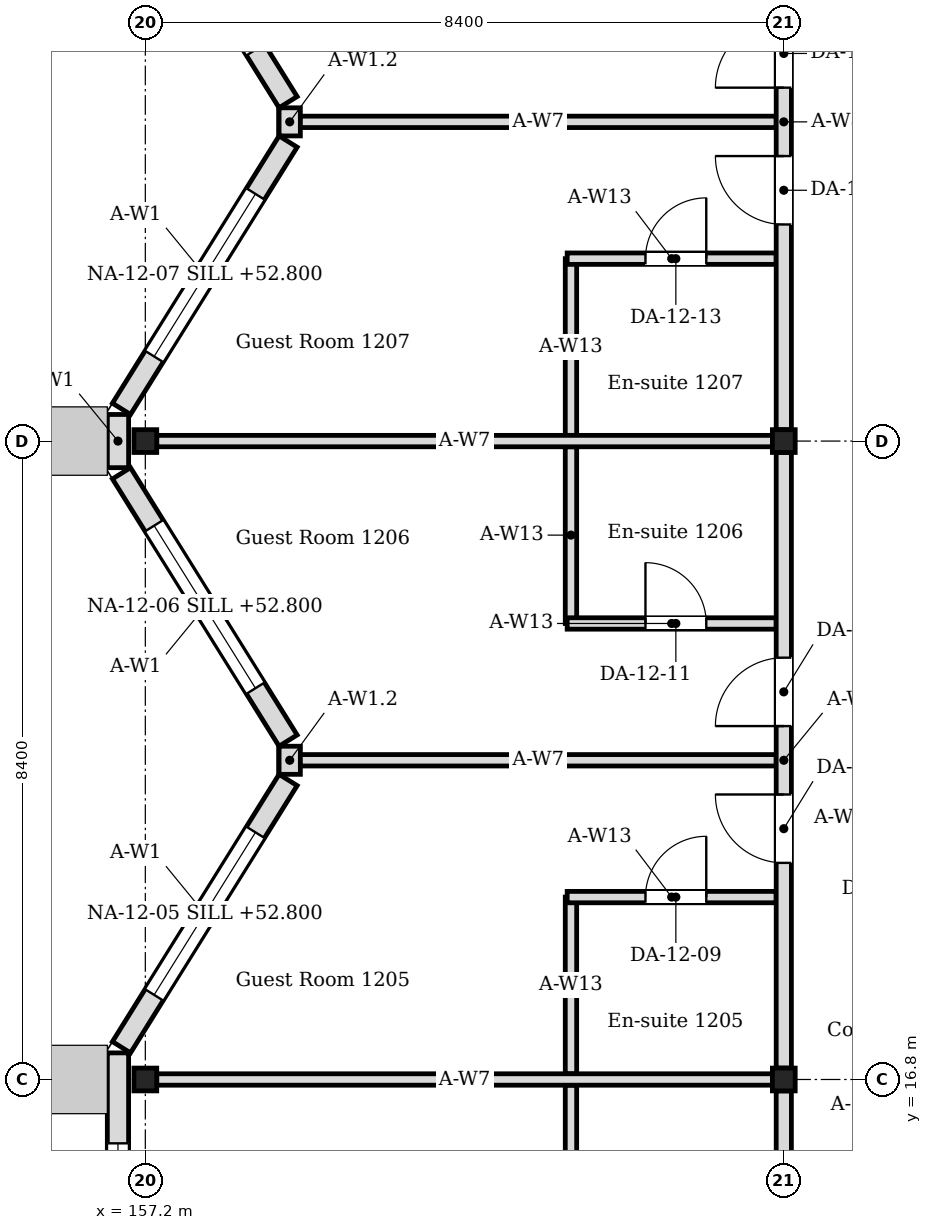
"""IFC4 building model, lengths in metres.
Left out: names, types, materials, properties, quantities, classifications, styles, units other than length and angle.
Written with IfcOpenShell. Run it as: python <this file> out.ifc"""

import sys

from ifc_helpers import new_model, si_unit, direction, frame, frame_2d, origin, origin_2d, place, context, subcontext, project, spatial, rectangle, i_section, extrude, element, fill, save


model = new_model("IFC4")
c1 = context("Model", 3, precision=1e-05, world=origin(), true_north=direction((0.0, 1.0)))
c2 = subcontext(c1, "Body", "Model", "MODEL_VIEW")
j1 = project(units=[si_unit("LENGTHUNIT", "METRE"), si_unit("PLANEANGLEUNIT", "RADIAN")], contexts=[c1])
p1 = place(None, origin())
s1 = spatial("IfcSite", under=j1, at=p1, CompositionType="ELEMENT")
p2 = place(p1, origin())
s2 = spatial("IfcBuilding", under=s1, at=p2, CompositionType="ELEMENT")
p3 = place(p2, frame((0.0, 0.0, 52.2)))
s3 = spatial("IfcBuildingStorey", under=s2, at=p3, CompositionType="ELEMENT", Elevation=52.2)
for number, where, z_axis, x_axis in (
    (1, (157.2, 16.8, 0.0), (0.0, 0.0, 1.0), (1.0, 0.0, 0.0)),
    (2, (157.2, 25.2, 0.0), (0.0, 0.0, 1.0), (1.0, 0.0, 0.0)),
    (3, (165.6, 16.8, 0.0), (0.0, 0.0, 1.0), (1.0, 0.0, 0.0)),
    (4, (165.6, 25.2, 0.0), (0.0, 0.0, 1.0), (1.0, 0.0, 0.0)),
):
    element("IfcColumn", number, at=place(p3, frame(where, z_axis=z_axis, x_axis=x_axis)), inside=s3, PredefinedType="COLUMN", context=c2, shape_type="SweptSolid", body=[
        extrude(i_section(OverallWidth=0.3, OverallDepth=0.3, WebThickness=0.01, FlangeThickness=0.015, FilletRadius=0.013, at=origin_2d()), origin(), (0.0, 0.0, 1.0), 4.2),
    ])
p4 = place(p3, frame((156.84, 8.05, 0.0), z_axis=(0.0, 0.0, 1.0), x_axis=(0.0, 1.0, 0.0)))
e5 = element("IfcWall", 5, at=p4, inside=s3, PredefinedType="SOLIDWALL", context=c2, shape_type="SweptSolid", body=[
    extrude(rectangle(XDim=9.1, YDim=0.28, at=frame_2d((4.55, 0.0))), origin(), (0.0, 0.0, 1.0), 4.05),
])
p5 = place(p4, frame((1.19, 0.0, 0.6)))
e6 = element("IfcOpeningElement", 6, at=p5, cuts=e5, PredefinedType="OPENING", context=c2, shape_type="SweptSolid", body=[
    extrude(rectangle(XDim=2.52, YDim=2.4, at=frame_2d((1.26, 1.2))), frame((0.0, 0.15, 0.0), z_axis=(0.0, -1.0, 0.0), x_axis=(1.0, 0.0, 0.0)), (0.0, 0.0, 1.0), 0.3),
])
p6 = place(p4, frame((5.39, 0.0, 0.6)))
e7 = element("IfcOpeningElement", 7, at=p6, cuts=e5, PredefinedType="OPENING", context=c2, shape_type="SweptSolid", body=[
    extrude(rectangle(XDim=2.52, YDim=2.4, at=frame_2d((1.26, 1.2))), frame((0.0, 0.15, 0.0), z_axis=(0.0, -1.0, 0.0), x_axis=(1.0, 0.0, 0.0)), (0.0, 0.0, 1.0), 0.3),
])
p7 = place(p3, frame((156.886, 17.224, 0.0), z_axis=(0.0, 0.0, 1.0), x_axis=(0.529018946142, 0.848610013271, 0.0)))
e8 = element("IfcWall", 8, at=p7, inside=s3, PredefinedType="SOLIDWALL", context=c2, shape_type="SweptSolid", body=[
    extrude(rectangle(XDim=4.144, YDim=0.28, at=frame_2d((2.072, 0.0))), origin(), (0.0, 0.0, 1.0), 4.05),
])
p8 = place(p7, frame((0.812, 0.0, 0.6)))
e9 = element("IfcOpeningElement", 9, at=p8, cuts=e8, PredefinedType="OPENING", context=c2, shape_type="SweptSolid", body=[
    extrude(rectangle(XDim=2.52, YDim=2.4, at=frame_2d((1.26, 1.2))), frame((0.0, 0.15, 0.0), z_axis=(0.0, -1.0, 0.0), x_axis=(1.0, 0.0, 0.0)), (0.0, 0.0, 1.0), 0.3),
])
p9 = place(p3, frame((159.079, 21.259, 0.0), z_axis=(0.0, 0.0, 1.0), x_axis=(-0.529018946142, 0.848610013271, 0.0)))
e10 = element("IfcWall", 10, at=p9, inside=s3, PredefinedType="SOLIDWALL", context=c2, shape_type="SweptSolid", body=[
    extrude(rectangle(XDim=4.144, YDim=0.28, at=frame_2d((2.072, 0.0))), origin(), (0.0, 0.0, 1.0), 4.05),
])
p10 = place(p9, frame((0.812, 0.0, 0.6)))
e11 = element("IfcOpeningElement", 11, at=p10, cuts=e10, PredefinedType="OPENING", context=c2, shape_type="SweptSolid", body=[
    extrude(rectangle(XDim=2.52, YDim=2.4, at=frame_2d((1.26, 1.2))), frame((0.0, 0.15, 0.0), z_axis=(0.0, -1.0, 0.0), x_axis=(1.0, 0.0, 0.0)), (0.0, 0.0, 1.0), 0.3),
])
p11 = place(p3, frame((159.1, 20.815, 0.0), z_axis=(0.0, 0.0, 1.0), x_axis=(0.0, 1.0, 0.0)))
e12 = element("IfcWall", 12, at=p11, inside=s3, PredefinedType="SOLIDWALL", context=c2, shape_type="SweptSolid", body=[
    extrude(rectangle(XDim=0.37, YDim=0.28, at=frame_2d((0.185, 0.0))), origin(), (0.0, 0.0, 1.0), 3.604),
])
p12 = place(p3, frame((156.84, 24.85, 0.0), z_axis=(0.0, 0.0, 1.0), x_axis=(0.0, 1.0, 0.0)))
e13 = element("IfcWall", 13, at=p12, inside=s3, PredefinedType="SOLIDWALL", context=c2, shape_type="SweptSolid", body=[
    extrude(rectangle(XDim=0.7, YDim=0.28, at=frame_2d((0.35, 0.0))), origin(), (0.0, 0.0, 1.0), 4.05),
])
p13 = place(p3, frame((156.886, 25.624, 0.0), z_axis=(0.0, 0.0, 1.0), x_axis=(0.528992500338, 0.848626498871, 0.0)))
e14 = element("IfcWall", 14, at=p13, inside=s3, PredefinedType="SOLIDWALL", context=c2, shape_type="SweptSolid", body=[
    extrude(rectangle(XDim=4.145, YDim=0.28, at=frame_2d((2.072, 0.0))), origin(), (0.0, 0.0, 1.0), 4.05),
])
p14 = place(p13, frame((0.812, 0.0, 0.6)))
e15 = element("IfcOpeningElement", 15, at=p14, cuts=e14, PredefinedType="OPENING", context=c2, shape_type="SweptSolid", body=[
    extrude(rectangle(XDim=2.52, YDim=2.4, at=frame_2d((1.26, 1.2))), frame((0.0, 0.15, 0.0), z_axis=(0.0, -1.0, 0.0), x_axis=(1.0, 0.0, 0.0)), (0.0, 0.0, 1.0), 0.3),
])
p15 = place(p3, frame((159.079, 29.659, 0.0), z_axis=(0.0, 0.0, 1.0), x_axis=(-0.529018946142, 0.848610013271, 0.0)))
e16 = element("IfcWall", 16, at=p15, inside=s3, PredefinedType="SOLIDWALL", context=c2, shape_type="SweptSolid", body=[
    extrude(rectangle(XDim=4.144, YDim=0.28, at=frame_2d((2.072, 0.0))), origin(), (0.0, 0.0, 1.0), 4.05),
])
p16 = place(p15, frame((0.812, 0.0, 0.6)))
e17 = element("IfcOpeningElement", 17, at=p16, cuts=e16, PredefinedType="OPENING", context=c2, shape_type="SweptSolid", body=[
    extrude(rectangle(XDim=2.52, YDim=2.4, at=frame_2d((1.26, 1.2))), frame((0.0, 0.15, 0.0), z_axis=(0.0, -1.0, 0.0), x_axis=(1.0, 0.0, 0.0)), (0.0, 0.0, 1.0), 0.3),
])
p17 = place(p3, frame((159.1, 29.215, 0.0), z_axis=(0.0, 0.0, 1.0), x_axis=(0.0, 1.0, 0.0)))
e18 = element("IfcWall", 18, at=p17, inside=s3, PredefinedType="SOLIDWALL", context=c2, shape_type="SweptSolid", body=[
    extrude(rectangle(XDim=0.37, YDim=0.28, at=frame_2d((0.185, 0.0))), origin(), (0.0, 0.0, 1.0), 3.604),
])
p18 = place(p3, frame((162.8, 14.4, 0.0), z_axis=(0.0, 0.0, 1.0), x_axis=(0.0, 1.0, 0.0)))
e19 = element("IfcWall", 19, at=p18, inside=s3, PredefinedType="PARTITIONING", context=c2, shape_type="SweptSolid", body=[
    extrude(rectangle(XDim=2.325, YDim=0.15, at=frame_2d((1.163, 0.0))), origin(), (0.0, 0.0, 1.0), 4.05),
])
p19 = place(p3, frame((162.8, 16.875, 0.0), z_axis=(0.0, 0.0, 1.0), x_axis=(0.0, 1.0, 0.0)))
e20 = element("IfcWall", 20, at=p19, inside=s3, PredefinedType="PARTITIONING", context=c2, shape_type="SweptSolid", body=[
    extrude(rectangle(XDim=2.325, YDim=0.15, at=frame_2d((1.163, 0.0))), origin(), (0.0, 0.0, 1.0), 4.05),
])
p20 = place(p3, frame((162.75, 19.2, 0.0), z_axis=(0.0, 0.0, 1.0), x_axis=(1.0, 0.0, 0.0)))
e21 = element("IfcWall", 21, at=p20, inside=s3, PredefinedType="PARTITIONING", context=c2, shape_type="SweptSolid", body=[
    extrude(rectangle(XDim=2.75, YDim=0.15, at=frame_2d((1.375, 0.0))), origin(), (0.0, 0.0, 1.0), 4.05),
])
p21 = place(p20, frame((1.03, 0.0, 0.0)))
e22 = element("IfcOpeningElement", 22, at=p21, cuts=e21, PredefinedType="OPENING", context=c2, shape_type="SweptSolid", body=[
    extrude(rectangle(XDim=0.8, YDim=2.1, at=frame_2d((0.4, 1.05))), frame((0.0, 0.085, 0.0), z_axis=(0.0, -1.0, 0.0), x_axis=(1.0, 0.0, 0.0)), (0.0, 0.0, 1.0), 0.17),
])
p22 = place(p3, frame((162.8, 22.8, 0.0), z_axis=(0.0, 0.0, 1.0), x_axis=(0.0, 1.0, 0.0)))
e23 = element("IfcWall", 23, at=p22, inside=s3, PredefinedType="PARTITIONING", context=c2, shape_type="SweptSolid", body=[
    extrude(rectangle(XDim=2.325, YDim=0.15, at=frame_2d((1.163, 0.0))), origin(), (0.0, 0.0, 1.0), 4.05),
])
p23 = place(p3, frame((162.75, 22.8, 0.0), z_axis=(0.0, 0.0, 1.0), x_axis=(1.0, 0.0, 0.0)))
e24 = element("IfcWall", 24, at=p23, inside=s3, PredefinedType="PARTITIONING", context=c2, shape_type="SweptSolid", body=[
    extrude(rectangle(XDim=2.75, YDim=0.15, at=frame_2d((1.375, 0.0))), origin(), (0.0, 0.0, 1.0), 4.05),
])
p24 = place(p23, frame((1.03, 0.0, 0.0)))
e25 = element("IfcOpeningElement", 25, at=p24, cuts=e24, PredefinedType="OPENING", context=c2, shape_type="SweptSolid", body=[
    extrude(rectangle(XDim=0.8, YDim=2.1, at=frame_2d((0.4, 1.05))), frame((0.0, 0.085, 0.0), z_axis=(0.0, -1.0, 0.0), x_axis=(1.0, 0.0, 0.0)), (0.0, 0.0, 1.0), 0.17),
])
p25 = place(p3, frame((162.8, 25.275, 0.0), z_axis=(0.0, 0.0, 1.0), x_axis=(0.0, 1.0, 0.0)))
e26 = element("IfcWall", 26, at=p25, inside=s3, PredefinedType="PARTITIONING", context=c2, shape_type="SweptSolid", body=[
    extrude(rectangle(XDim=2.325, YDim=0.15, at=frame_2d((1.163, 0.0))), origin(), (0.0, 0.0, 1.0), 4.05),
])
p26 = place(p3, frame((162.75, 27.6, 0.0), z_axis=(0.0, 0.0, 1.0), x_axis=(1.0, 0.0, 0.0)))
e27 = element("IfcWall", 27, at=p26, inside=s3, PredefinedType="PARTITIONING", context=c2, shape_type="SweptSolid", body=[
    extrude(rectangle(XDim=2.75, YDim=0.15, at=frame_2d((1.375, 0.0))), origin(), (0.0, 0.0, 1.0), 4.05),
])
p27 = place(p26, frame((1.03, 0.0, 0.0)))
e28 = element("IfcOpeningElement", 28, at=p27, cuts=e27, PredefinedType="OPENING", context=c2, shape_type="SweptSolid", body=[
    extrude(rectangle(XDim=0.8, YDim=2.1, at=frame_2d((0.4, 1.05))), frame((0.0, 0.085, 0.0), z_axis=(0.0, -1.0, 0.0), x_axis=(1.0, 0.0, 0.0)), (0.0, 0.0, 1.0), 0.17),
])
for number, where, z_axis, x_axis in (
    (29, (157.35, 16.8, 0.0), (0.0, 0.0, 1.0), (1.0, 0.0, 0.0)),
    (30, (157.35, 25.2, 0.0), (0.0, 0.0, 1.0), (1.0, 0.0, 0.0)),
):
    element("IfcWall", number, at=place(p3, frame(where, z_axis=z_axis, x_axis=x_axis)), inside=s3, PredefinedType="PARTITIONING", context=c2, shape_type="SweptSolid", body=[
        extrude(rectangle(XDim=8.1, YDim=0.15, at=frame_2d((4.05, 0.0))), origin(), (0.0, 0.0, 1.0), 3.604),
    ])
for number, where, z_axis, x_axis in (
    (31, (159.24, 21.0, 0.0), (0.0, 0.0, 1.0), (1.0, 0.0, 0.0)),
    (32, (159.24, 29.4, 0.0), (0.0, 0.0, 1.0), (1.0, 0.0, 0.0)),
):
    element("IfcWall", number, at=place(p3, frame(where, z_axis=z_axis, x_axis=x_axis)), inside=s3, PredefinedType="PARTITIONING", context=c2, shape_type="SweptSolid", body=[
        extrude(rectangle(XDim=6.26, YDim=0.15, at=frame_2d((3.13, 0.0))), origin(), (0.0, 0.0, 1.0), 3.604),
    ])
p28 = place(p3, frame((165.6, 8.55, 0.0), z_axis=(0.0, 0.0, 1.0), x_axis=(0.0, 1.0, 0.0)))
e33 = element("IfcWall", 33, at=p28, inside=s3, PredefinedType="PARTITIONING", context=c2, shape_type="SweptSolid", body=[
    extrude(rectangle(XDim=8.1, YDim=0.2, at=frame_2d((4.05, 0.0))), origin(), (0.0, 0.0, 1.0), 3.45),
])
p29 = place(p28, frame((2.7, 0.0, 0.0)))
e34 = element("IfcOpeningElement", 34, at=p29, cuts=e33, PredefinedType="OPENING", context=c2, shape_type="SweptSolid", body=[
    extrude(rectangle(XDim=0.9, YDim=2.1, at=frame_2d((0.45, 1.05))), frame((0.0, 0.11, 0.0), z_axis=(0.0, -1.0, 0.0), x_axis=(1.0, 0.0, 0.0)), (0.0, 0.0, 1.0), 0.22),
])
p30 = place(p28, frame((4.5, 0.0, 0.0)))
e35 = element("IfcOpeningElement", 35, at=p30, cuts=e33, PredefinedType="OPENING", context=c2, shape_type="SweptSolid", body=[
    extrude(rectangle(XDim=0.9, YDim=2.1, at=frame_2d((0.45, 1.05))), frame((0.0, 0.11, 0.0), z_axis=(0.0, -1.0, 0.0), x_axis=(1.0, 0.0, 0.0)), (0.0, 0.0, 1.0), 0.22),
])
p31 = place(p3, frame((165.6, 16.95, 0.0), z_axis=(0.0, 0.0, 1.0), x_axis=(0.0, 1.0, 0.0)))
e36 = element("IfcWall", 36, at=p31, inside=s3, PredefinedType="PARTITIONING", context=c2, shape_type="SweptSolid", body=[
    extrude(rectangle(XDim=8.1, YDim=0.2, at=frame_2d((4.05, 0.0))), origin(), (0.0, 0.0, 1.0), 3.45),
])
p32 = place(p31, frame((2.7, 0.0, 0.0)))
e37 = element("IfcOpeningElement", 37, at=p32, cuts=e36, PredefinedType="OPENING", context=c2, shape_type="SweptSolid", body=[
    extrude(rectangle(XDim=0.9, YDim=2.1, at=frame_2d((0.45, 1.05))), frame((0.0, 0.11, 0.0), z_axis=(0.0, -1.0, 0.0), x_axis=(1.0, 0.0, 0.0)), (0.0, 0.0, 1.0), 0.22),
])
p33 = place(p31, frame((4.5, 0.0, 0.0)))
e38 = element("IfcOpeningElement", 38, at=p33, cuts=e36, PredefinedType="OPENING", context=c2, shape_type="SweptSolid", body=[
    extrude(rectangle(XDim=0.9, YDim=2.1, at=frame_2d((0.45, 1.05))), frame((0.0, 0.11, 0.0), z_axis=(0.0, -1.0, 0.0), x_axis=(1.0, 0.0, 0.0)), (0.0, 0.0, 1.0), 0.22),
])
p34 = place(p3, frame((165.6, 25.35, 0.0), z_axis=(0.0, 0.0, 1.0), x_axis=(0.0, 1.0, 0.0)))
e39 = element("IfcWall", 39, at=p34, inside=s3, PredefinedType="PARTITIONING", context=c2, shape_type="SweptSolid", body=[
    extrude(rectangle(XDim=8.1, YDim=0.2, at=frame_2d((4.05, 0.0))), origin(), (0.0, 0.0, 1.0), 3.45),
])
p35 = place(p34, frame((2.7, 0.0, 0.0)))
e40 = element("IfcOpeningElement", 40, at=p35, cuts=e39, PredefinedType="OPENING", context=c2, shape_type="SweptSolid", body=[
    extrude(rectangle(XDim=0.9, YDim=2.1, at=frame_2d((0.45, 1.05))), frame((0.0, 0.11, 0.0), z_axis=(0.0, -1.0, 0.0), x_axis=(1.0, 0.0, 0.0)), (0.0, 0.0, 1.0), 0.22),
])
p36 = place(p34, frame((4.5, 0.0, 0.0)))
e41 = element("IfcOpeningElement", 41, at=p36, cuts=e39, PredefinedType="OPENING", context=c2, shape_type="SweptSolid", body=[
    extrude(rectangle(XDim=0.9, YDim=2.1, at=frame_2d((0.45, 1.05))), frame((0.0, 0.11, 0.0), z_axis=(0.0, -1.0, 0.0), x_axis=(1.0, 0.0, 0.0)), (0.0, 0.0, 1.0), 0.22),
])
p37 = place(p6, origin())
e42 = element("IfcWindow", 42, at=p37, inside=s3, PartitioningType="SINGLE_PANEL", PredefinedType="WINDOW", context=c2, shape_type="SweptSolid", body=[
    extrude(rectangle(XDim=2.52, YDim=2.4, at=frame_2d((1.26, 1.2))), frame((0.0, 0.03, 0.0), z_axis=(0.0, -1.0, 0.0), x_axis=(1.0, 0.0, 0.0)), (0.0, 0.0, 1.0), 0.06),
])
fill(e7, e42)
p38 = place(p8, origin())
e43 = element("IfcWindow", 43, at=p38, inside=s3, PartitioningType="SINGLE_PANEL", PredefinedType="WINDOW", context=c2, shape_type="SweptSolid", body=[
    extrude(rectangle(XDim=2.52, YDim=2.4, at=frame_2d((1.26, 1.2))), frame((0.0, 0.03, 0.0), z_axis=(0.0, -1.0, 0.0), x_axis=(1.0, 0.0, 0.0)), (0.0, 0.0, 1.0), 0.06),
])
fill(e9, e43)
p39 = place(p10, origin())
e44 = element("IfcWindow", 44, at=p39, inside=s3, PartitioningType="SINGLE_PANEL", PredefinedType="WINDOW", context=c2, shape_type="SweptSolid", body=[
    extrude(rectangle(XDim=2.52, YDim=2.4, at=frame_2d((1.26, 1.2))), frame((0.0, 0.03, 0.0), z_axis=(0.0, -1.0, 0.0), x_axis=(1.0, 0.0, 0.0)), (0.0, 0.0, 1.0), 0.06),
])
fill(e11, e44)
p40 = place(p14, origin())
e45 = element("IfcWindow", 45, at=p40, inside=s3, PartitioningType="SINGLE_PANEL", PredefinedType="WINDOW", context=c2, shape_type="SweptSolid", body=[
    extrude(rectangle(XDim=2.52, YDim=2.4, at=frame_2d((1.26, 1.2))), frame((0.0, 0.03, 0.0), z_axis=(0.0, -1.0, 0.0), x_axis=(1.0, 0.0, 0.0)), (0.0, 0.0, 1.0), 0.06),
])
fill(e15, e45)
p41 = place(p21, origin())
e46 = element("IfcDoor", 46, at=p41, inside=s3, OperationType="SINGLE_SWING_RIGHT", PredefinedType="DOOR", context=c2, shape_type="SweptSolid", body=[
    extrude(rectangle(XDim=0.8, YDim=2.1, at=frame_2d((0.4, 1.05))), frame((0.0, 0.025, 0.0), z_axis=(0.0, -1.0, 0.0), x_axis=(1.0, 0.0, 0.0)), (0.0, 0.0, 1.0), 0.05),
])
fill(e22, e46)
p42 = place(p32, origin())
e47 = element("IfcDoor", 47, at=p42, inside=s3, OperationType="SINGLE_SWING_RIGHT", PredefinedType="DOOR", context=c2, shape_type="SweptSolid", body=[
    extrude(rectangle(XDim=0.9, YDim=2.1, at=frame_2d((0.45, 1.05))), frame((0.0, 0.025, 0.0), z_axis=(0.0, -1.0, 0.0), x_axis=(1.0, 0.0, 0.0)), (0.0, 0.0, 1.0), 0.05),
])
fill(e37, e47)
p43 = place(p24, origin())
e48 = element("IfcDoor", 48, at=p43, inside=s3, OperationType="SINGLE_SWING_LEFT", PredefinedType="DOOR", context=c2, shape_type="SweptSolid", body=[
    extrude(rectangle(XDim=0.8, YDim=2.1, at=frame_2d((0.4, 1.05))), frame((0.0, 0.025, 0.0), z_axis=(0.0, -1.0, 0.0), x_axis=(1.0, 0.0, 0.0)), (0.0, 0.0, 1.0), 0.05),
])
fill(e25, e48)
p44 = place(p33, origin())
e49 = element("IfcDoor", 49, at=p44, inside=s3, OperationType="SINGLE_SWING_LEFT", PredefinedType="DOOR", context=c2, shape_type="SweptSolid", body=[
    extrude(rectangle(XDim=0.9, YDim=2.1, at=frame_2d((0.45, 1.05))), frame((0.0, 0.025, 0.0), z_axis=(0.0, -1.0, 0.0), x_axis=(1.0, 0.0, 0.0)), (0.0, 0.0, 1.0), 0.05),
])
fill(e38, e49)
p45 = place(p27, origin())
e50 = element("IfcDoor", 50, at=p45, inside=s3, OperationType="SINGLE_SWING_RIGHT", PredefinedType="DOOR", context=c2, shape_type="SweptSolid", body=[
    extrude(rectangle(XDim=0.8, YDim=2.1, at=frame_2d((0.4, 1.05))), frame((0.0, 0.025, 0.0), z_axis=(0.0, -1.0, 0.0), x_axis=(1.0, 0.0, 0.0)), (0.0, 0.0, 1.0), 0.05),
])
fill(e28, e50)
p46 = place(p35, origin())
e51 = element("IfcDoor", 51, at=p46, inside=s3, OperationType="SINGLE_SWING_RIGHT", PredefinedType="DOOR", context=c2, shape_type="SweptSolid", body=[
    extrude(rectangle(XDim=0.9, YDim=2.1, at=frame_2d((0.45, 1.05))), frame((0.0, 0.025, 0.0), z_axis=(0.0, -1.0, 0.0), x_axis=(1.0, 0.0, 0.0)), (0.0, 0.0, 1.0), 0.05),
])
fill(e40, e51)
p47 = place(p36, origin())
e52 = element("IfcDoor", 52, at=p47, inside=s3, OperationType="SINGLE_SWING_LEFT", PredefinedType="DOOR", context=c2, shape_type="SweptSolid", body=[
    extrude(rectangle(XDim=0.9, YDim=2.1, at=frame_2d((0.45, 1.05))), frame((0.0, 0.025, 0.0), z_axis=(0.0, -1.0, 0.0), x_axis=(1.0, 0.0, 0.0)), (0.0, 0.0, 1.0), 0.05),
])
fill(e41, e52)
save(model, sys.argv[1])
